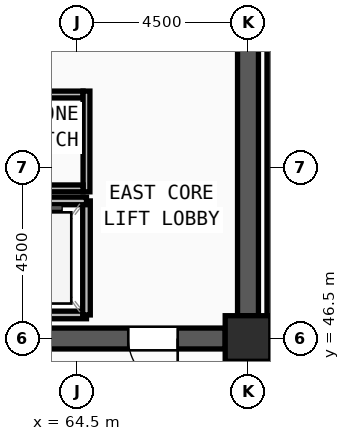
"""IFC4 building model, lengths in metres.
Left out: names, types, materials, properties, quantities, classifications, styles, units other than length and angle.
Written with IfcOpenShell. Run it as: python <this file> out.ifc"""

import sys

from ifc_helpers import new_model, si_unit, direction, frame, frame_2d, origin, origin_2d, place, context, subcontext, project, spatial, rectangle, extrude, source, transform, mapped, element, fill, save


model = new_model("IFC4")
c1 = context("Model", 3, precision=1e-05, world=origin(), true_north=direction((0.0, 1.0)))
c2 = subcontext(c1, "Body", "Model", "MODEL_VIEW")
j1 = project(units=[si_unit("LENGTHUNIT", "METRE"), si_unit("PLANEANGLEUNIT", "RADIAN")], contexts=[c1])
p1 = place(None, origin())
s1 = spatial("IfcSite", under=j1, at=p1, CompositionType="ELEMENT")
p2 = place(p1, origin())
s2 = spatial("IfcBuilding", under=s1, at=p2, CompositionType="ELEMENT")
p3 = place(p2, frame((0.0, 0.0, 286.5)))
s3 = spatial("IfcBuildingStorey", under=s2, at=p3, CompositionType="ELEMENT", Elevation=286.5)
m1 = source(origin(), c2, "Body", "SweptSolid", [
    extrude(rectangle(XDim=1.2, YDim=1.2, at=origin_2d()), origin(), (0.0, 0.0, 1.0), 3.75),
])
p4 = place(p3, frame((69.0, 46.5, 0.0), z_axis=(0.0, 0.0, 1.0), x_axis=(1.0, 0.0, 0.0)))
e1 = element("IfcColumn", 1, at=p4, inside=s3, PredefinedType="COLUMN", context=c2, shape_type="MappedRepresentation", body=[
    mapped(m1, transform((0.0, 0.0, 0.0), x_axis=(1.0, 0.0, 0.0), y_axis=(0.0, 1.0, 0.0), z_axis=(0.0, 0.0, 1.0), scale=1.0)),
])
p5 = place(p3, frame((69.0, 60.9, 0.0), z_axis=(0.0, 0.0, 1.0), x_axis=(0.0, -1.0, 0.0)))
e2 = element("IfcWall", 2, at=p5, inside=s3, PredefinedType="SHEAR", context=c2, shape_type="SweptSolid", body=[
    extrude(rectangle(XDim=13.8, YDim=0.55, at=frame_2d((6.9, 0.0))), origin(), (0.0, 0.0, 1.0), 3.57),
])
m2 = source(origin(), c2, "Body", "SweptSolid", [
    extrude(rectangle(XDim=1.2, YDim=2.2, at=frame_2d((0.6, 1.1))), frame((0.0, 0.285, 0.0), z_axis=(0.0, -1.0, 0.0), x_axis=(1.0, 0.0, 0.0)), (0.0, 0.0, 1.0), 0.57),
])
p6 = place(p5, frame((1.35, 0.0, 0.0)))
e3 = element("IfcOpeningElement", 3, at=p6, cuts=e2, PredefinedType="OPENING", context=c2, shape_type="MappedRepresentation", body=[
    mapped(m2, transform((0.0, 0.0, 0.0), x_axis=(1.0, 0.0, 0.0), y_axis=(0.0, 1.0, 0.0), z_axis=(0.0, 0.0, 1.0), scale=1.0)),
])
p7 = place(p3, frame((68.4, 46.5, 0.0), z_axis=(0.0, 0.0, 1.0), x_axis=(-1.0, 0.0, 0.0)))
e4 = element("IfcWall", 4, at=p7, inside=s3, PredefinedType="SHEAR", context=c2, shape_type="SweptSolid", body=[
    extrude(rectangle(XDim=7.8, YDim=0.55, at=frame_2d((3.9, 0.0))), origin(), (0.0, 0.0, 1.0), 3.57),
])
m3 = source(origin(), c2, "Body", "SweptSolid", [
    extrude(rectangle(XDim=1.3, YDim=2.2, at=frame_2d((0.65, 1.1))), frame((0.0, 0.285, 0.0), z_axis=(0.0, -1.0, 0.0), x_axis=(1.0, 0.0, 0.0)), (0.0, 0.0, 1.0), 0.57),
])
p8 = place(p7, frame((1.25, 0.0, 0.0)))
e5 = element("IfcOpeningElement", 5, at=p8, cuts=e4, PredefinedType="OPENING", context=c2, shape_type="MappedRepresentation", body=[
    mapped(m3, transform((0.0, 0.0, 0.0), x_axis=(1.0, 0.0, 0.0), y_axis=(0.0, 1.0, 0.0), z_axis=(0.0, 0.0, 1.0), scale=1.0)),
])
p9 = place(p3, frame((69.62, 54.52, 0.0), z_axis=(0.0, 0.0, 1.0), x_axis=(0.0, -1.0, 0.0)))
e6 = element("IfcWall", 6, at=p9, inside=s3, PredefinedType="SOLIDWALL", context=c2, shape_type="SweptSolid", body=[
    extrude(rectangle(XDim=7.82, YDim=0.24, at=frame_2d((3.91, 0.0))), origin(), (0.0, 0.0, 1.0), 3.57),
])
p10 = place(p3, frame((62.35, 47.12, 0.0), z_axis=(0.0, 0.0, 1.0), x_axis=(1.0, 0.0, 0.0)))
e7 = element("IfcWall", 7, at=p10, inside=s3, PredefinedType="SOLIDWALL", context=c2, shape_type="SweptSolid", body=[
    extrude(rectangle(XDim=2.4, YDim=0.2, at=frame_2d((1.2, 0.0))), origin(), (0.0, 0.0, 1.0), 3.57),
])
p11 = place(p3, frame((64.75, 47.12, 0.0), z_axis=(0.0, 0.0, 1.0), x_axis=(0.0, 1.0, 0.0)))
e8 = element("IfcWall", 8, at=p11, inside=s3, PredefinedType="SOLIDWALL", context=c2, shape_type="SweptSolid", body=[
    extrude(rectangle(XDim=3.0, YDim=0.2, at=frame_2d((1.5, 0.0))), origin(), (0.0, 0.0, 1.0), 3.57),
])
p12 = place(p3, frame((64.75, 50.12, 0.0), z_axis=(0.0, 0.0, 1.0), x_axis=(-1.0, 0.0, 0.0)))
e9 = element("IfcWall", 9, at=p12, inside=s3, PredefinedType="SOLIDWALL", context=c2, shape_type="SweptSolid", body=[
    extrude(rectangle(XDim=2.4, YDim=0.2, at=frame_2d((1.2, 0.0))), origin(), (0.0, 0.0, 1.0), 3.57),
])
p13 = place(p3, frame((60.0, 52.92, 0.0), z_axis=(0.0, 0.0, 1.0), x_axis=(1.0, 0.0, 0.0)))
e10 = element("IfcWall", 10, at=p13, inside=s3, PredefinedType="PARTITIONING", context=c2, shape_type="SweptSolid", body=[
    extrude(rectangle(XDim=4.66, YDim=0.18, at=frame_2d((2.33, 0.0))), origin(), (0.0, 0.0, 1.0), 3.57),
])
m4 = source(origin(), c2, "Body", "SweptSolid", [
    extrude(rectangle(XDim=0.85, YDim=2.1, at=frame_2d((0.425, 1.05))), frame((0.0, 0.1, 0.0), z_axis=(0.0, -1.0, 0.0), x_axis=(1.0, 0.0, 0.0)), (0.0, 0.0, 1.0), 0.2),
])
p14 = place(p13, frame((1.975, 0.0, 0.0)))
e11 = element("IfcOpeningElement", 11, at=p14, cuts=e10, PredefinedType="OPENING", context=c2, shape_type="MappedRepresentation", body=[
    mapped(m4, transform((0.0, 0.0, 0.0), x_axis=(1.0, 0.0, 0.0), y_axis=(0.0, 1.0, 0.0), z_axis=(0.0, 0.0, 1.0), scale=1.0)),
])
p15 = place(p3, frame((64.75, 50.36, 0.0), z_axis=(0.0, 0.0, 1.0), x_axis=(0.0, 1.0, 0.0)))
e12 = element("IfcWall", 12, at=p15, inside=s3, PredefinedType="PARTITIONING", context=c2, shape_type="SweptSolid", body=[
    extrude(rectangle(XDim=2.65, YDim=0.18, at=frame_2d((1.325, 0.0))), origin(), (0.0, 0.0, 1.0), 3.57),
])
p16 = place(p3, frame((60.0, 50.45, 0.0), z_axis=(0.0, 0.0, 1.0), x_axis=(1.0, 0.0, 0.0)))
e13 = element("IfcWall", 13, at=p16, inside=s3, PredefinedType="PARTITIONING", context=c2, shape_type="SweptSolid", body=[
    extrude(rectangle(XDim=4.66, YDim=0.18, at=frame_2d((2.33, 0.0))), origin(), (0.0, 0.0, 1.0), 3.57),
])
m5 = source(origin(), c2, "Body", "SweptSolid", [
    extrude(rectangle(XDim=1.3, YDim=2.2, at=frame_2d((0.65, 1.1))), frame((0.0, 0.025, 0.0), z_axis=(0.0, -1.0, 0.0), x_axis=(1.0, 0.0, 0.0)), (0.0, 0.0, 1.0), 0.05),
])
p17 = place(p8, origin())
e14 = element("IfcDoor", 14, at=p17, inside=s3, OperationType="SINGLE_SWING_LEFT", PredefinedType="DOOR", context=c2, shape_type="MappedRepresentation", body=[
    mapped(m5, transform((0.0, 0.0, 0.0), x_axis=(1.0, 0.0, 0.0), y_axis=(0.0, 1.0, 0.0), z_axis=(0.0, 0.0, 1.0), scale=1.0)),
])
fill(e5, e14)
save(model, sys.argv[1])
